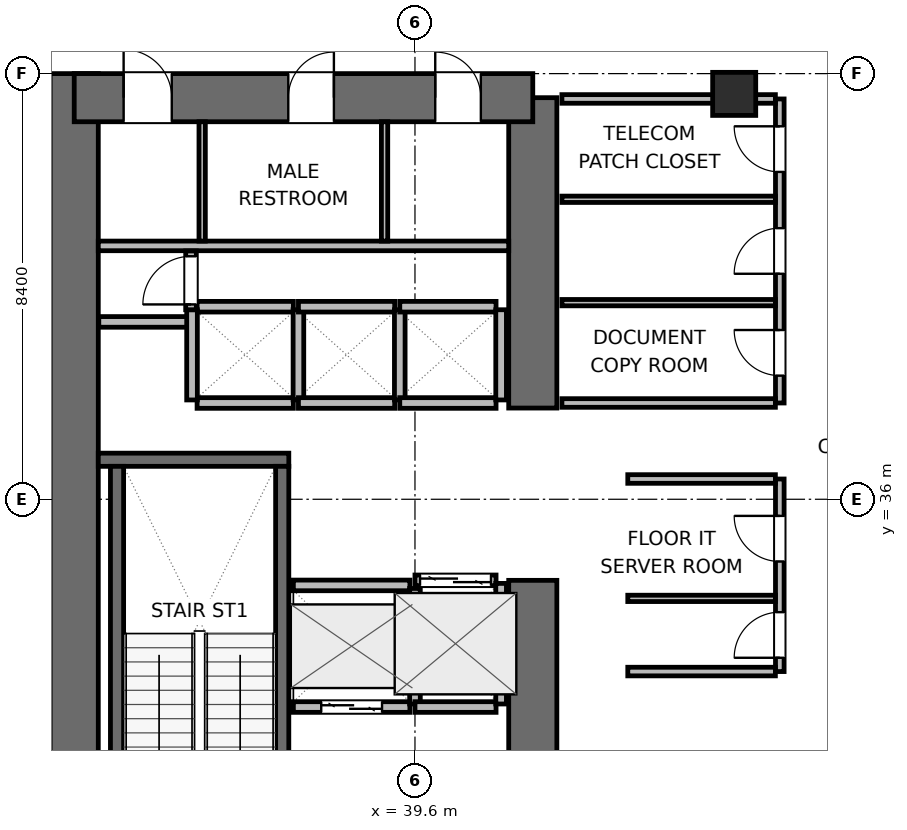
"""IFC4 building model, lengths in metres.
Left out: names, types, materials, properties, quantities, classifications, styles, units other than length and angle.
Written with IfcOpenShell. Run it as: python <this file> out.ifc"""

import sys

from ifc_helpers import new_model, si_unit, direction, frame, frame_2d, origin, origin_2d, place, context, subcontext, project, spatial, rectangle, extrude, element, fill, save


model = new_model("IFC4")
c1 = context("Model", 3, precision=1e-05, world=origin(), true_north=direction((0.0, 1.0)))
c2 = subcontext(c1, "Body", "Model", "MODEL_VIEW")
j1 = project(units=[si_unit("LENGTHUNIT", "METRE"), si_unit("PLANEANGLEUNIT", "RADIAN")], contexts=[c1])
p1 = place(None, origin())
s1 = spatial("IfcSite", under=j1, at=p1, CompositionType="ELEMENT")
p2 = place(p1, origin())
s2 = spatial("IfcBuilding", under=s1, at=p2, CompositionType="ELEMENT")
p3 = place(p2, frame((0.0, 0.0, 33.3)))
s3 = spatial("IfcBuildingStorey", under=s2, at=p3, CompositionType="ELEMENT", Elevation=33.3)
p4 = place(p3, frame((32.875, 27.6, 0.0), z_axis=(0.0, 0.0, 1.0), x_axis=(0.0, 1.0, 0.0)))
e1 = element("IfcWall", 1, at=p4, inside=s3, PredefinedType="SHEAR", context=c2, shape_type="SweptSolid", body=[
    extrude(rectangle(XDim=16.8, YDim=0.95, at=frame_2d((8.4, 0.0))), origin(), (0.0, 0.0, 1.0), 3.9),
])
p5 = place(p3, frame((41.925, 28.075, 0.0), z_axis=(0.0, 0.0, 1.0), x_axis=(0.0, 1.0, 0.0)))
e2 = element("IfcWall", 2, at=p5, inside=s3, PredefinedType="SHEAR", context=c2, shape_type="SweptSolid", body=[
    extrude(rectangle(XDim=6.325, YDim=0.95, at=frame_2d((3.163, 0.0))), origin(), (0.0, 0.0, 1.0), 3.9),
])
p6 = place(p3, frame((41.925, 37.8, 0.0), z_axis=(0.0, 0.0, 1.0), x_axis=(0.0, 1.0, 0.0)))
e3 = element("IfcWall", 3, at=p6, inside=s3, PredefinedType="SHEAR", context=c2, shape_type="SweptSolid", body=[
    extrude(rectangle(XDim=6.125, YDim=0.95, at=frame_2d((3.062, 0.0))), origin(), (0.0, 0.0, 1.0), 3.9),
])
p7 = place(p3, frame((32.875, 43.925, 0.0), z_axis=(0.0, 0.0, 1.0), x_axis=(1.0, 0.0, 0.0)))
e4 = element("IfcWall", 4, at=p7, inside=s3, PredefinedType="SHEAR", context=c2, shape_type="SweptSolid", body=[
    extrude(rectangle(XDim=9.05, YDim=0.95, at=frame_2d((4.525, 0.0))), origin(), (0.0, 0.0, 1.0), 3.9),
])
p8 = place(p7, frame((0.975, 0.0, 0.0)))
e5 = element("IfcOpeningElement", 5, at=p8, cuts=e4, PredefinedType="OPENING", context=c2, shape_type="SweptSolid", body=[
    extrude(rectangle(XDim=0.95, YDim=2.04, at=frame_2d((0.475, 1.02))), frame((0.0, 0.485, 0.0), z_axis=(0.0, -1.0, 0.0), x_axis=(1.0, 0.0, 0.0)), (0.0, 0.0, 1.0), 0.97),
])
p9 = place(p7, frame((4.225, 0.0, 0.0)))
e6 = element("IfcOpeningElement", 6, at=p9, cuts=e4, PredefinedType="OPENING", context=c2, shape_type="SweptSolid", body=[
    extrude(rectangle(XDim=0.9, YDim=2.02, at=frame_2d((0.45, 1.01))), frame((0.0, 0.485, 0.0), z_axis=(0.0, -1.0, 0.0), x_axis=(1.0, 0.0, 0.0)), (0.0, 0.0, 1.0), 0.97),
])
p10 = place(p7, frame((7.125, 0.0, 0.0)))
e7 = element("IfcOpeningElement", 7, at=p10, cuts=e4, PredefinedType="OPENING", context=c2, shape_type="SweptSolid", body=[
    extrude(rectangle(XDim=0.9, YDim=2.02, at=frame_2d((0.45, 1.01))), frame((0.0, 0.485, 0.0), z_axis=(0.0, -1.0, 0.0), x_axis=(1.0, 0.0, 0.0)), (0.0, 0.0, 1.0), 0.97),
])
p11 = place(p3, frame((33.35, 36.78, 0.0), z_axis=(0.0, 0.0, 1.0), x_axis=(1.0, 0.0, 0.0)))
e8 = element("IfcWall", 8, at=p11, inside=s3, PredefinedType="SHEAR", context=c2, shape_type="SweptSolid", body=[
    extrude(rectangle(XDim=3.76, YDim=0.26, at=frame_2d((1.88, 0.0))), origin(), (0.0, 0.0, 1.0), 3.9),
])
p12 = place(p3, frame((33.72, 29.05, 0.0), z_axis=(0.0, 0.0, 1.0), x_axis=(0.0, 1.0, 0.0)))
e9 = element("IfcWall", 9, at=p12, inside=s3, PredefinedType="SHEAR", context=c2, shape_type="SweptSolid", body=[
    extrude(rectangle(XDim=7.6, YDim=0.26, at=frame_2d((3.8, 0.0))), origin(), (0.0, 0.0, 1.0), 3.9),
])
p13 = place(p3, frame((36.98, 29.05, 0.0), z_axis=(0.0, 0.0, 1.0), x_axis=(0.0, 1.0, 0.0)))
e10 = element("IfcWall", 10, at=p13, inside=s3, PredefinedType="SHEAR", context=c2, shape_type="SweptSolid", body=[
    extrude(rectangle(XDim=7.6, YDim=0.26, at=frame_2d((3.8, 0.0))), origin(), (0.0, 0.0, 1.0), 3.9),
])
p14 = place(p13, frame((0.3, 0.0, 0.0)))
e11 = element("IfcOpeningElement", 11, at=p14, cuts=e10, PredefinedType="OPENING", context=c2, shape_type="SweptSolid", body=[
    extrude(rectangle(XDim=1.0, YDim=2.04, at=frame_2d((0.5, 1.02))), frame((0.0, 0.14, 0.0), z_axis=(0.0, -1.0, 0.0), x_axis=(1.0, 0.0, 0.0)), (0.0, 0.0, 1.0), 0.28),
])
p15 = place(p3, frame((45.9, 44.0, 0.0), z_axis=(0.0, 0.0, 1.0), x_axis=(1.0, 0.0, 0.0)))
e12 = element("IfcColumn", 12, at=p15, inside=s3, PredefinedType="COLUMN", context=c2, shape_type="SweptSolid", body=[
    extrude(rectangle(XDim=0.85, YDim=0.85, at=origin_2d()), origin(), (0.0, 0.0, 1.0), 3.9),
])
p16 = place(p3, frame((33.35, 41.0, 0.0), z_axis=(0.0, 0.0, 1.0), x_axis=(1.0, 0.0, 0.0)))
e13 = element("IfcWall", 13, at=p16, inside=s3, PredefinedType="PLUMBINGWALL", context=c2, shape_type="SweptSolid", body=[
    extrude(rectangle(XDim=8.1, YDim=0.19, at=frame_2d((4.05, 0.0))), origin(), (0.0, 0.0, 1.0), 3.64),
])
for number, where, z_axis, x_axis in (
    (14, (35.4, 41.095, 0.0), (0.0, 0.0, 1.0), (0.0, 1.0, 0.0)),
    (15, (39.0, 41.095, 0.0), (0.0, 0.0, 1.0), (0.0, 1.0, 0.0)),
):
    element("IfcWall", number, at=place(p3, frame(where, z_axis=z_axis, x_axis=x_axis)), inside=s3, PredefinedType="PARTITIONING", context=c2, shape_type="SweptSolid", body=[
        extrude(rectangle(XDim=2.355, YDim=0.125, at=frame_2d((1.177, 0.0))), origin(), (0.0, 0.0, 1.0), 3.64),
    ])
p17 = place(p3, frame((33.36, 39.5, 0.0), z_axis=(0.0, 0.0, 1.0), x_axis=(1.0, 0.0, 0.0)))
e16 = element("IfcWall", 16, at=p17, inside=s3, PredefinedType="PARTITIONING", context=c2, shape_type="SweptSolid", body=[
    extrude(rectangle(XDim=1.86, YDim=0.21, at=frame_2d((0.93, 0.0))), origin(), (0.0, 0.0, 1.0), 3.64),
])
p18 = place(p3, frame((37.2, 31.9, 0.0), z_axis=(0.0, 0.0, 1.0), x_axis=(1.0, 0.0, 0.0)))
e17 = element("IfcWall", 17, at=p18, inside=s3, PredefinedType="PARTITIONING", context=c2, shape_type="SweptSolid", body=[
    extrude(rectangle(XDim=2.3, YDim=0.21, at=frame_2d((1.15, 0.0))), origin(), (0.0, 0.0, 1.0), 3.64),
])
p19 = place(p18, frame((0.55, 0.0, 0.0)))
e18 = element("IfcOpeningElement", 18, at=p19, cuts=e17, PredefinedType="OPENING", context=c2, shape_type="SweptSolid", body=[
    extrude(rectangle(XDim=1.2, YDim=2.04, at=frame_2d((0.6, 1.02))), frame((0.0, 0.115, 0.0), z_axis=(0.0, -1.0, 0.0), x_axis=(1.0, 0.0, 0.0)), (0.0, 0.0, 1.0), 0.23),
])
p20 = place(p3, frame((37.2, 34.3, 0.0), z_axis=(0.0, 0.0, 1.0), x_axis=(1.0, 0.0, 0.0)))
e19 = element("IfcWall", 19, at=p20, inside=s3, PredefinedType="PARTITIONING", context=c2, shape_type="SweptSolid", body=[
    extrude(rectangle(XDim=2.3, YDim=0.21, at=frame_2d((1.15, 0.0))), origin(), (0.0, 0.0, 1.0), 3.64),
])
p21 = place(p3, frame((39.6, 31.96, 0.0), z_axis=(0.0, 0.0, 1.0), x_axis=(0.0, 1.0, 0.0)))
e20 = element("IfcWall", 20, at=p21, inside=s3, PredefinedType="PARTITIONING", context=c2, shape_type="SweptSolid", body=[
    extrude(rectangle(XDim=2.28, YDim=0.21, at=frame_2d((1.14, 0.0))), origin(), (0.0, 0.0, 1.0), 3.64),
])
p22 = place(p3, frame((39.6, 34.4, 0.0), z_axis=(0.0, 0.0, 1.0), x_axis=(1.0, 0.0, 0.0)))
e21 = element("IfcWall", 21, at=p22, inside=s3, PredefinedType="PARTITIONING", context=c2, shape_type="SweptSolid", body=[
    extrude(rectangle(XDim=1.6, YDim=0.21, at=frame_2d((0.8, 0.0))), origin(), (0.0, 0.0, 1.0), 3.64),
])
p23 = place(p22, frame((0.1, 0.0, 0.0)))
e22 = element("IfcOpeningElement", 22, at=p23, cuts=e21, PredefinedType="OPENING", context=c2, shape_type="SweptSolid", body=[
    extrude(rectangle(XDim=1.4, YDim=2.06, at=frame_2d((0.7, 1.03))), frame((0.0, 0.115, 0.0), z_axis=(0.0, -1.0, 0.0), x_axis=(1.0, 0.0, 0.0)), (0.0, 0.0, 1.0), 0.23),
])
p24 = place(p3, frame((39.6, 31.9, 0.0), z_axis=(0.0, 0.0, 1.0), x_axis=(1.0, 0.0, 0.0)))
e23 = element("IfcWall", 23, at=p24, inside=s3, PredefinedType="PARTITIONING", context=c2, shape_type="SweptSolid", body=[
    extrude(rectangle(XDim=1.6, YDim=0.21, at=frame_2d((0.8, 0.0))), origin(), (0.0, 0.0, 1.0), 3.64),
])
p25 = place(p3, frame((41.3, 31.96, 0.0), z_axis=(0.0, 0.0, 1.0), x_axis=(0.0, 1.0, 0.0)))
e24 = element("IfcWall", 24, at=p25, inside=s3, PredefinedType="PARTITIONING", context=c2, shape_type="SweptSolid", body=[
    extrude(rectangle(XDim=2.38, YDim=0.21, at=frame_2d((1.19, 0.0))), origin(), (0.0, 0.0, 1.0), 3.64),
])
for number, where, z_axis, x_axis in (
    (25, (35.3, 37.9, 0.0), (0.0, 0.0, 1.0), (1.0, 0.0, 0.0)),
    (26, (35.3, 39.8, 0.0), (0.0, 0.0, 1.0), (1.0, 0.0, 0.0)),
):
    element("IfcWall", number, at=place(p3, frame(where, z_axis=z_axis, x_axis=x_axis)), inside=s3, PredefinedType="PARTITIONING", context=c2, shape_type="SweptSolid", body=[
        extrude(rectangle(XDim=1.9, YDim=0.21, at=frame_2d((0.95, 0.0))), origin(), (0.0, 0.0, 1.0), 3.64),
    ])
for number, where, z_axis, x_axis in (
    (27, (35.2, 37.96, 0.0), (0.0, 0.0, 1.0), (0.0, 1.0, 0.0)),
    (28, (37.3, 37.96, 0.0), (0.0, 0.0, 1.0), (0.0, 1.0, 0.0)),
):
    element("IfcWall", number, at=place(p3, frame(where, z_axis=z_axis, x_axis=x_axis)), inside=s3, PredefinedType="PARTITIONING", context=c2, shape_type="SweptSolid", body=[
        extrude(rectangle(XDim=1.78, YDim=0.21, at=frame_2d((0.89, 0.0))), origin(), (0.0, 0.0, 1.0), 3.64),
    ])
for number, where, z_axis, x_axis in (
    (29, (37.3, 37.9, 0.0), (0.0, 0.0, 1.0), (1.0, 0.0, 0.0)),
    (30, (37.3, 39.8, 0.0), (0.0, 0.0, 1.0), (1.0, 0.0, 0.0)),
):
    element("IfcWall", number, at=place(p3, frame(where, z_axis=z_axis, x_axis=x_axis)), inside=s3, PredefinedType="PARTITIONING", context=c2, shape_type="SweptSolid", body=[
        extrude(rectangle(XDim=1.9, YDim=0.21, at=frame_2d((0.95, 0.0))), origin(), (0.0, 0.0, 1.0), 3.64),
    ])
p26 = place(p3, frame((39.3, 37.96, 0.0), z_axis=(0.0, 0.0, 1.0), x_axis=(0.0, 1.0, 0.0)))
e31 = element("IfcWall", 31, at=p26, inside=s3, PredefinedType="PARTITIONING", context=c2, shape_type="SweptSolid", body=[
    extrude(rectangle(XDim=1.78, YDim=0.21, at=frame_2d((0.89, 0.0))), origin(), (0.0, 0.0, 1.0), 3.64),
])
for number, where, z_axis, x_axis in (
    (32, (39.3, 37.9, 0.0), (0.0, 0.0, 1.0), (1.0, 0.0, 0.0)),
    (33, (39.3, 39.8, 0.0), (0.0, 0.0, 1.0), (1.0, 0.0, 0.0)),
):
    element("IfcWall", number, at=place(p3, frame(where, z_axis=z_axis, x_axis=x_axis)), inside=s3, PredefinedType="PARTITIONING", context=c2, shape_type="SweptSolid", body=[
        extrude(rectangle(XDim=1.9, YDim=0.21, at=frame_2d((0.95, 0.0))), origin(), (0.0, 0.0, 1.0), 3.64),
    ])
p27 = place(p3, frame((41.3, 37.96, 0.0), z_axis=(0.0, 0.0, 1.0), x_axis=(0.0, 1.0, 0.0)))
e34 = element("IfcWall", 34, at=p27, inside=s3, PredefinedType="PARTITIONING", context=c2, shape_type="SweptSolid", body=[
    extrude(rectangle(XDim=1.78, YDim=0.21, at=frame_2d((0.89, 0.0))), origin(), (0.0, 0.0, 1.0), 3.64),
])
p28 = place(p3, frame((35.18, 39.74, 0.0), z_axis=(0.0, 0.0, 1.0), x_axis=(0.0, 1.0, 0.0)))
e35 = element("IfcWall", 35, at=p28, inside=s3, PredefinedType="PARTITIONING", context=c2, shape_type="SweptSolid", body=[
    extrude(rectangle(XDim=1.16, YDim=0.21, at=frame_2d((0.58, 0.0))), origin(), (0.0, 0.0, 1.0), 3.64),
])
p29 = place(p28, frame((0.105, 0.0, 0.0)))
e36 = element("IfcOpeningElement", 36, at=p29, cuts=e35, PredefinedType="OPENING", context=c2, shape_type="SweptSolid", body=[
    extrude(rectangle(XDim=0.95, YDim=2.04, at=frame_2d((0.475, 1.02))), frame((0.0, 0.115, 0.0), z_axis=(0.0, -1.0, 0.0), x_axis=(1.0, 0.0, 0.0)), (0.0, 0.0, 1.0), 0.23),
])
p30 = place(p3, frame((46.8, 32.6, 0.0), z_axis=(0.0, 0.0, 1.0), x_axis=(0.0, 1.0, 0.0)))
e37 = element("IfcWall", 37, at=p30, inside=s3, PredefinedType="PARTITIONING", context=c2, shape_type="SweptSolid", body=[
    extrude(rectangle(XDim=3.8, YDim=0.17, at=frame_2d((1.9, 0.0))), origin(), (0.0, 0.0, 1.0), 3.64),
])
p31 = place(p30, frame((0.272, 0.0, 0.0)))
e38 = element("IfcOpeningElement", 38, at=p31, cuts=e37, PredefinedType="OPENING", context=c2, shape_type="SweptSolid", body=[
    extrude(rectangle(XDim=0.9, YDim=2.02, at=frame_2d((0.45, 1.01))), frame((0.0, 0.095, 0.0), z_axis=(0.0, -1.0, 0.0), x_axis=(1.0, 0.0, 0.0)), (0.0, 0.0, 1.0), 0.19),
])
p32 = place(p30, frame((2.172, 0.0, 0.0)))
e39 = element("IfcOpeningElement", 39, at=p32, cuts=e37, PredefinedType="OPENING", context=c2, shape_type="SweptSolid", body=[
    extrude(rectangle(XDim=0.9, YDim=2.02, at=frame_2d((0.45, 1.01))), frame((0.0, 0.095, 0.0), z_axis=(0.0, -1.0, 0.0), x_axis=(1.0, 0.0, 0.0)), (0.0, 0.0, 1.0), 0.19),
])
for number, where, z_axis, x_axis in (
    (40, (43.8, 32.6, 0.0), (0.0, 0.0, 1.0), (1.0, 0.0, 0.0)),
    (41, (43.8, 36.4, 0.0), (0.0, 0.0, 1.0), (1.0, 0.0, 0.0)),
):
    element("IfcWall", number, at=place(p3, frame(where, z_axis=z_axis, x_axis=x_axis)), inside=s3, PredefinedType="PARTITIONING", context=c2, shape_type="SweptSolid", body=[
        extrude(rectangle(XDim=2.913, YDim=0.17, at=frame_2d((1.457, 0.0))), origin(), (0.0, 0.0, 1.0), 3.64),
    ])
p33 = place(p3, frame((43.8, 34.044, 0.0), z_axis=(0.0, 0.0, 1.0), x_axis=(1.0, 0.0, 0.0)))
e42 = element("IfcWall", 42, at=p33, inside=s3, PredefinedType="PARTITIONING", context=c2, shape_type="SweptSolid", body=[
    extrude(rectangle(XDim=2.913, YDim=0.125, at=frame_2d((1.457, 0.0))), origin(), (0.0, 0.0, 1.0), 3.64),
])
p34 = place(p3, frame((46.8, 37.9, 0.0), z_axis=(0.0, 0.0, 1.0), x_axis=(0.0, 1.0, 0.0)))
e43 = element("IfcWall", 43, at=p34, inside=s3, PredefinedType="PARTITIONING", context=c2, shape_type="SweptSolid", body=[
    extrude(rectangle(XDim=6.0, YDim=0.17, at=frame_2d((3.0, 0.0))), origin(), (0.0, 0.0, 1.0), 3.64),
])
p35 = place(p34, frame((0.54, 0.0, 0.0)))
e44 = element("IfcOpeningElement", 44, at=p35, cuts=e43, PredefinedType="OPENING", context=c2, shape_type="SweptSolid", body=[
    extrude(rectangle(XDim=0.9, YDim=2.02, at=frame_2d((0.45, 1.01))), frame((0.0, 0.095, 0.0), z_axis=(0.0, -1.0, 0.0), x_axis=(1.0, 0.0, 0.0)), (0.0, 0.0, 1.0), 0.19),
])
p36 = place(p34, frame((2.55, 0.0, 0.0)))
e45 = element("IfcOpeningElement", 45, at=p36, cuts=e43, PredefinedType="OPENING", context=c2, shape_type="SweptSolid", body=[
    extrude(rectangle(XDim=0.9, YDim=2.02, at=frame_2d((0.45, 1.01))), frame((0.0, 0.095, 0.0), z_axis=(0.0, -1.0, 0.0), x_axis=(1.0, 0.0, 0.0)), (0.0, 0.0, 1.0), 0.19),
])
p37 = place(p34, frame((4.56, 0.0, 0.0)))
e46 = element("IfcOpeningElement", 46, at=p37, cuts=e43, PredefinedType="OPENING", context=c2, shape_type="SweptSolid", body=[
    extrude(rectangle(XDim=0.9, YDim=2.02, at=frame_2d((0.45, 1.01))), frame((0.0, 0.095, 0.0), z_axis=(0.0, -1.0, 0.0), x_axis=(1.0, 0.0, 0.0)), (0.0, 0.0, 1.0), 0.19),
])
p38 = place(p3, frame((42.5, 37.9, 0.0), z_axis=(0.0, 0.0, 1.0), x_axis=(1.0, 0.0, 0.0)))
e47 = element("IfcWall", 47, at=p38, inside=s3, PredefinedType="PARTITIONING", context=c2, shape_type="SweptSolid", body=[
    extrude(rectangle(XDim=4.213, YDim=0.17, at=frame_2d((2.106, 0.0))), origin(), (0.0, 0.0, 1.0), 3.64),
])
p39 = place(p3, frame((42.5, 43.9, 0.0), z_axis=(0.0, 0.0, 1.0), x_axis=(1.0, 0.0, 0.0)))
e48 = element("IfcWall", 48, at=p39, inside=s3, PredefinedType="PARTITIONING", context=c2, shape_type="SweptSolid", body=[
    extrude(rectangle(XDim=4.213, YDim=0.17, at=frame_2d((2.106, 0.0))), origin(), (0.0, 0.0, 1.0), 2.525),
])
for number, where, z_axis, x_axis in (
    (49, (42.5, 39.88, 0.0), (0.0, 0.0, 1.0), (1.0, 0.0, 0.0)),
    (50, (42.5, 41.92, 0.0), (0.0, 0.0, 1.0), (1.0, 0.0, 0.0)),
):
    element("IfcWall", number, at=place(p3, frame(where, z_axis=z_axis, x_axis=x_axis)), inside=s3, PredefinedType="PARTITIONING", context=c2, shape_type="SweptSolid", body=[
        extrude(rectangle(XDim=4.213, YDim=0.125, at=frame_2d((2.106, 0.0))), origin(), (0.0, 0.0, 1.0), 3.64),
    ])
p40 = place(p19, origin())
e51 = element("IfcDoor", 51, at=p40, inside=s3, OperationType="DOUBLE_DOOR_SLIDING", PredefinedType="DOOR", context=c2, shape_type="SweptSolid", body=[
    extrude(rectangle(XDim=1.2, YDim=2.04, at=frame_2d((0.6, 1.02))), frame((0.0, 0.025, 0.0), z_axis=(0.0, -1.0, 0.0), x_axis=(1.0, 0.0, 0.0)), (0.0, 0.0, 1.0), 0.05),
])
fill(e18, e51)
p41 = place(p23, origin())
e52 = element("IfcDoor", 52, at=p41, inside=s3, OperationType="DOUBLE_DOOR_SLIDING", PredefinedType="DOOR", context=c2, shape_type="SweptSolid", body=[
    extrude(rectangle(XDim=1.4, YDim=2.06, at=frame_2d((0.7, 1.03))), frame((0.0, 0.025, 0.0), z_axis=(0.0, -1.0, 0.0), x_axis=(1.0, 0.0, 0.0)), (0.0, 0.0, 1.0), 0.05),
])
fill(e22, e52)
p42 = place(p8, origin())
e53 = element("IfcDoor", 53, at=p42, inside=s3, OperationType="SINGLE_SWING_LEFT", PredefinedType="DOOR", context=c2, shape_type="SweptSolid", body=[
    extrude(rectangle(XDim=0.95, YDim=2.04, at=frame_2d((0.475, 1.02))), frame((0.0, 0.025, 0.0), z_axis=(0.0, -1.0, 0.0), x_axis=(1.0, 0.0, 0.0)), (0.0, 0.0, 1.0), 0.05),
])
fill(e5, e53)
p43 = place(p9, origin())
e54 = element("IfcDoor", 54, at=p43, inside=s3, OperationType="SINGLE_SWING_RIGHT", PredefinedType="DOOR", context=c2, shape_type="SweptSolid", body=[
    extrude(rectangle(XDim=0.9, YDim=2.02, at=frame_2d((0.45, 1.01))), frame((0.0, 0.025, 0.0), z_axis=(0.0, -1.0, 0.0), x_axis=(1.0, 0.0, 0.0)), (0.0, 0.0, 1.0), 0.05),
])
fill(e6, e54)
p44 = place(p10, origin())
e55 = element("IfcDoor", 55, at=p44, inside=s3, OperationType="SINGLE_SWING_LEFT", PredefinedType="DOOR", context=c2, shape_type="SweptSolid", body=[
    extrude(rectangle(XDim=0.9, YDim=2.02, at=frame_2d((0.45, 1.01))), frame((0.0, 0.025, 0.0), z_axis=(0.0, -1.0, 0.0), x_axis=(1.0, 0.0, 0.0)), (0.0, 0.0, 1.0), 0.05),
])
fill(e7, e55)
p45 = place(p29, origin())
e56 = element("IfcDoor", 56, at=p45, inside=s3, OperationType="SINGLE_SWING_LEFT", PredefinedType="DOOR", context=c2, shape_type="SweptSolid", body=[
    extrude(rectangle(XDim=0.95, YDim=2.04, at=frame_2d((0.475, 1.02))), frame((0.0, 0.025, 0.0), z_axis=(0.0, -1.0, 0.0), x_axis=(1.0, 0.0, 0.0)), (0.0, 0.0, 1.0), 0.05),
])
fill(e36, e56)
p46 = place(p31, origin())
e57 = element("IfcDoor", 57, at=p46, inside=s3, OperationType="SINGLE_SWING_LEFT", PredefinedType="DOOR", context=c2, shape_type="SweptSolid", body=[
    extrude(rectangle(XDim=0.9, YDim=2.02, at=frame_2d((0.45, 1.01))), frame((0.0, 0.025, 0.0), z_axis=(0.0, -1.0, 0.0), x_axis=(1.0, 0.0, 0.0)), (0.0, 0.0, 1.0), 0.05),
])
fill(e38, e57)
p47 = place(p32, origin())
e58 = element("IfcDoor", 58, at=p47, inside=s3, OperationType="SINGLE_SWING_RIGHT", PredefinedType="DOOR", context=c2, shape_type="SweptSolid", body=[
    extrude(rectangle(XDim=0.9, YDim=2.02, at=frame_2d((0.45, 1.01))), frame((0.0, 0.025, 0.0), z_axis=(0.0, -1.0, 0.0), x_axis=(1.0, 0.0, 0.0)), (0.0, 0.0, 1.0), 0.05),
])
fill(e39, e58)
p48 = place(p35, origin())
e59 = element("IfcDoor", 59, at=p48, inside=s3, OperationType="SINGLE_SWING_RIGHT", PredefinedType="DOOR", context=c2, shape_type="SweptSolid", body=[
    extrude(rectangle(XDim=0.9, YDim=2.02, at=frame_2d((0.45, 1.01))), frame((0.0, 0.025, 0.0), z_axis=(0.0, -1.0, 0.0), x_axis=(1.0, 0.0, 0.0)), (0.0, 0.0, 1.0), 0.05),
])
fill(e44, e59)
p49 = place(p36, origin())
e60 = element("IfcDoor", 60, at=p49, inside=s3, OperationType="SINGLE_SWING_LEFT", PredefinedType="DOOR", context=c2, shape_type="SweptSolid", body=[
    extrude(rectangle(XDim=0.9, YDim=2.02, at=frame_2d((0.45, 1.01))), frame((0.0, 0.025, 0.0), z_axis=(0.0, -1.0, 0.0), x_axis=(1.0, 0.0, 0.0)), (0.0, 0.0, 1.0), 0.05),
])
fill(e45, e60)
p50 = place(p37, origin())
e61 = element("IfcDoor", 61, at=p50, inside=s3, OperationType="SINGLE_SWING_RIGHT", PredefinedType="DOOR", context=c2, shape_type="SweptSolid", body=[
    extrude(rectangle(XDim=0.9, YDim=2.02, at=frame_2d((0.45, 1.01))), frame((0.0, 0.025, 0.0), z_axis=(0.0, -1.0, 0.0), x_axis=(1.0, 0.0, 0.0)), (0.0, 0.0, 1.0), 0.05),
])
fill(e46, e61)
save(model, sys.argv[1])
